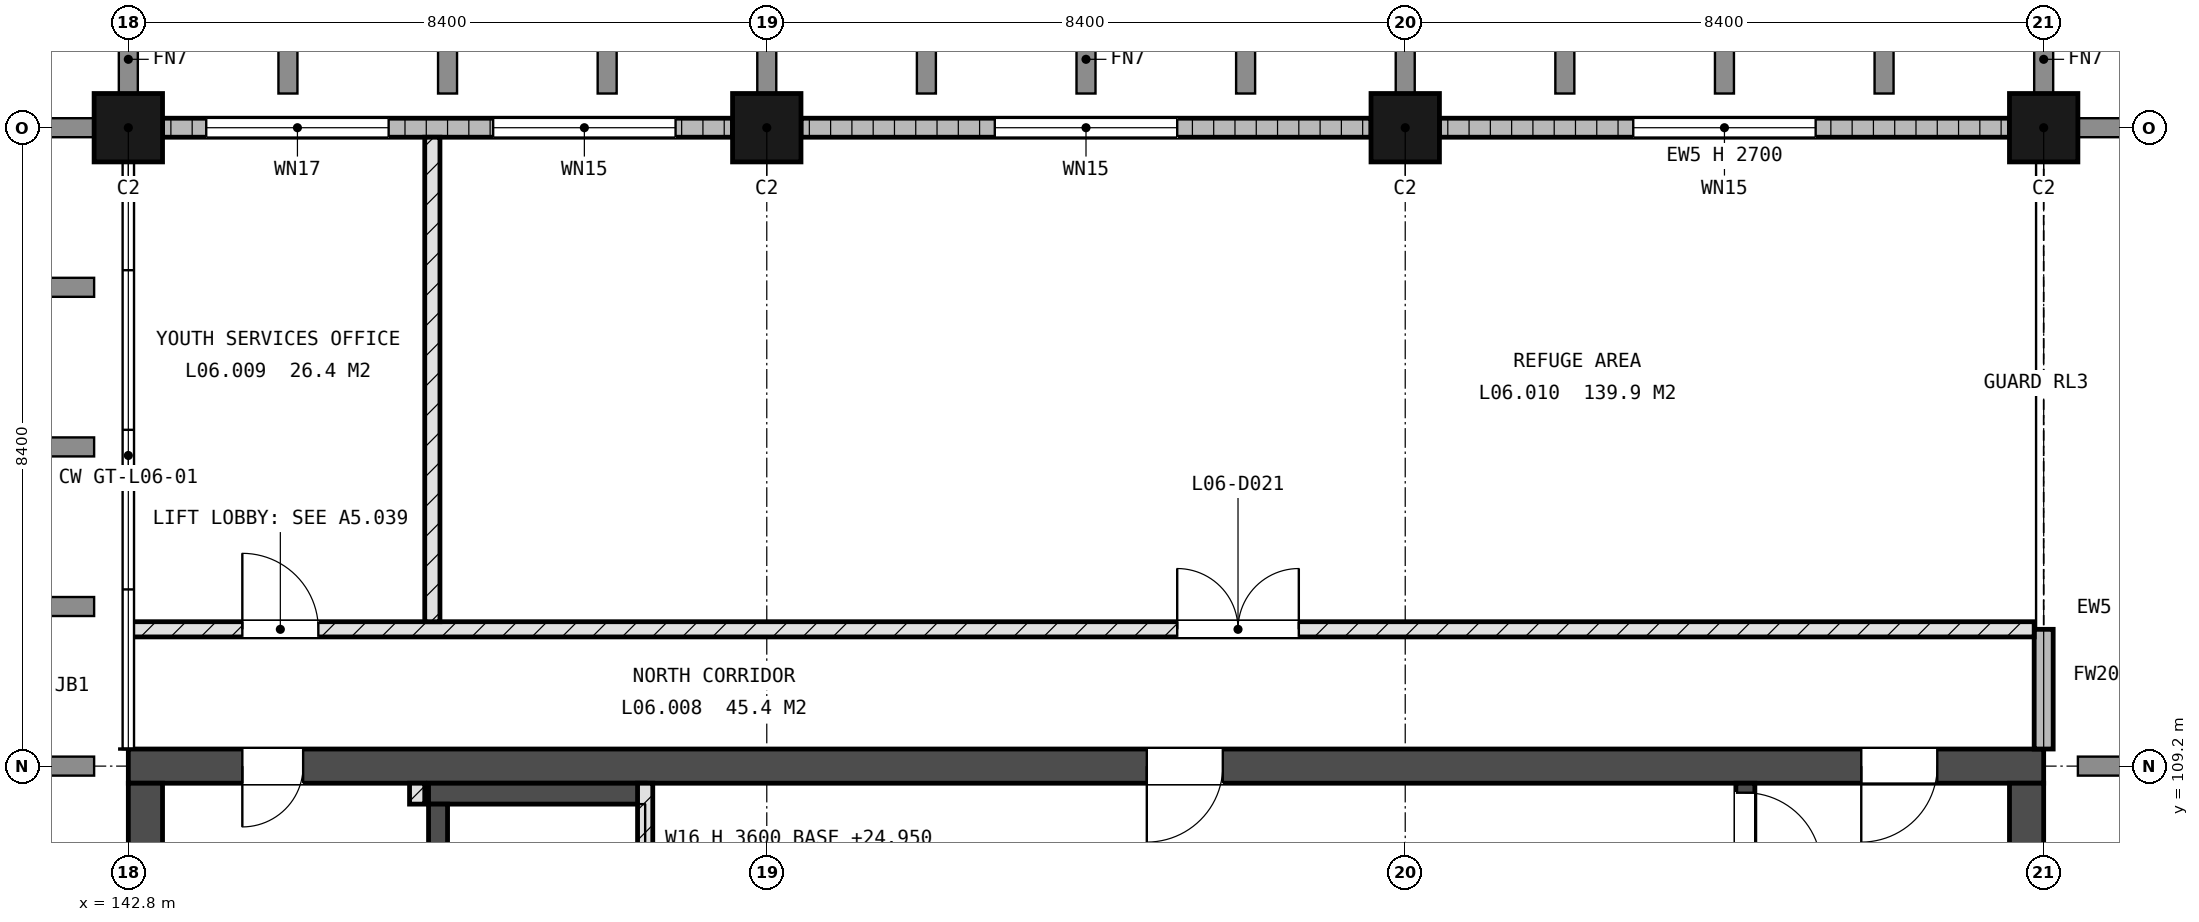
"""IFC4 building model, lengths in metres.
Left out: names, types, materials, properties, quantities, classifications, styles, units other than length and angle.
Written with IfcOpenShell. Run it as: python <this file> out.ifc"""

import sys

from ifc_helpers import new_model, si_unit, direction, frame, frame_2d, origin, origin_2d, place, context, subcontext, project, spatial, rectangle, extrude, element, fill, save


model = new_model("IFC4")
c1 = context("Model", 3, precision=1e-05, world=origin(), true_north=direction((0.0, 1.0)))
c2 = subcontext(c1, "Body", "Model", "MODEL_VIEW")
j1 = project(units=[si_unit("LENGTHUNIT", "METRE"), si_unit("PLANEANGLEUNIT", "RADIAN")], contexts=[c1])
p1 = place(None, origin())
s1 = spatial("IfcSite", under=j1, at=p1, CompositionType="ELEMENT")
p2 = place(p1, origin())
s2 = spatial("IfcBuilding", under=s1, at=p2, CompositionType="ELEMENT")
p3 = place(p2, frame((0.0, 0.0, 25.2)))
s3 = spatial("IfcBuildingStorey", under=s2, at=p3, CompositionType="ELEMENT", Elevation=25.2)
for number, where, z_axis, x_axis in (
    (1, (142.8, 117.6, -0.25), (0.0, 0.0, 1.0), (1.0, 0.0, 0.0)),
    (2, (151.2, 117.6, -0.25), (0.0, 0.0, 1.0), (1.0, 0.0, 0.0)),
    (3, (159.6, 117.6, -0.25), (0.0, 0.0, 1.0), (1.0, 0.0, 0.0)),
    (4, (168.0, 117.6, -0.25), (0.0, 0.0, 1.0), (1.0, 0.0, 0.0)),
):
    element("IfcColumn", number, at=place(p3, frame(where, z_axis=z_axis, x_axis=x_axis)), inside=s3, PredefinedType="COLUMN", context=c2, shape_type="SweptSolid", body=[
        extrude(rectangle(XDim=0.9, YDim=0.9, at=origin_2d()), origin(), (0.0, 0.0, 1.0), 3.6),
    ])
p4 = place(p3, frame((142.8, 109.2, -0.25), z_axis=(0.0, 0.0, 1.0), x_axis=(1.0, 0.0, 0.0)))
e5 = element("IfcWall", 5, at=p4, inside=s3, PredefinedType="SHEAR", context=c2, shape_type="SweptSolid", body=[
    extrude(rectangle(XDim=25.2, YDim=0.45, at=frame_2d((12.6, 0.0))), origin(), (0.0, 0.0, 1.0), 3.6),
])
p5 = place(p4, frame((22.8, 0.0, 0.25)))
e6 = element("IfcOpeningElement", 6, at=p5, cuts=e5, PredefinedType="OPENING", context=c2, shape_type="SweptSolid", body=[
    extrude(rectangle(XDim=1.0, YDim=2.1, at=frame_2d((0.5, 1.05))), frame((0.0, 0.235, 0.0), z_axis=(0.0, -1.0, 0.0), x_axis=(1.0, 0.0, 0.0)), (0.0, 0.0, 1.0), 0.47),
])
p6 = place(p4, frame((1.5, 0.0, 0.25)))
e7 = element("IfcOpeningElement", 7, at=p6, cuts=e5, PredefinedType="OPENING", context=c2, shape_type="SweptSolid", body=[
    extrude(rectangle(XDim=0.8, YDim=2.1, at=frame_2d((0.4, 1.05))), frame((0.0, 0.235, 0.0), z_axis=(0.0, -1.0, 0.0), x_axis=(1.0, 0.0, 0.0)), (0.0, 0.0, 1.0), 0.47),
])
p7 = place(p4, frame((13.4, 0.0, 0.25)))
e8 = element("IfcOpeningElement", 8, at=p7, cuts=e5, PredefinedType="OPENING", context=c2, shape_type="SweptSolid", body=[
    extrude(rectangle(XDim=1.0, YDim=2.1, at=frame_2d((0.5, 1.05))), frame((0.0, 0.235, 0.0), z_axis=(0.0, -1.0, 0.0), x_axis=(1.0, 0.0, 0.0)), (0.0, 0.0, 1.0), 0.47),
])
p8 = place(p3, frame((143.025, 92.625, -0.25), z_axis=(0.0, 0.0, 1.0), x_axis=(0.0, 1.0, 0.0)))
e9 = element("IfcWall", 9, at=p8, inside=s3, PredefinedType="SHEAR", context=c2, shape_type="SweptSolid", body=[
    extrude(rectangle(XDim=16.35, YDim=0.45, at=frame_2d((8.175, 0.0))), origin(), (0.0, 0.0, 1.0), 3.6),
])
p9 = place(p8, frame((2.975, 0.0, 1.85)))
e10 = element("IfcOpeningElement", 10, at=p9, cuts=e9, PredefinedType="OPENING", context=c2, shape_type="SweptSolid", body=[
    extrude(rectangle(XDim=1.2, YDim=0.9, at=frame_2d((0.6, 0.45))), frame((0.0, 0.235, 0.0), z_axis=(0.0, -1.0, 0.0), x_axis=(1.0, 0.0, 0.0)), (0.0, 0.0, 1.0), 0.47),
])
p10 = place(p3, frame((167.775, 92.625, -0.25), z_axis=(0.0, 0.0, 1.0), x_axis=(0.0, 1.0, 0.0)))
e11 = element("IfcWall", 11, at=p10, inside=s3, PredefinedType="SHEAR", context=c2, shape_type="SweptSolid", body=[
    extrude(rectangle(XDim=16.35, YDim=0.45, at=frame_2d((8.175, 0.0))), origin(), (0.0, 0.0, 1.0), 3.6),
])
p11 = place(p10, frame((12.175, 0.0, 1.85)))
e12 = element("IfcOpeningElement", 12, at=p11, cuts=e11, PredefinedType="OPENING", context=c2, shape_type="SweptSolid", body=[
    extrude(rectangle(XDim=1.2, YDim=0.9, at=frame_2d((0.6, 0.45))), frame((0.0, 0.235, 0.0), z_axis=(0.0, -1.0, 0.0), x_axis=(1.0, 0.0, 0.0)), (0.0, 0.0, 1.0), 0.47),
])
p12 = place(p3, frame((164.075, 101.35, -0.25), z_axis=(0.0, 0.0, 1.0), x_axis=(0.0, 1.0, 0.0)))
e13 = element("IfcWall", 13, at=p12, inside=s3, PredefinedType="SHEAR", context=c2, shape_type="SweptSolid", body=[
    extrude(rectangle(XDim=7.625, YDim=0.25, at=frame_2d((3.812, 0.0))), origin(), (0.0, 0.0, 1.0), 3.6),
])
p13 = place(p12, frame((6.5, 0.0, 0.25)))
e14 = element("IfcOpeningElement", 14, at=p13, cuts=e13, PredefinedType="OPENING", context=c2, shape_type="SweptSolid", body=[
    extrude(rectangle(XDim=1.0, YDim=2.1, at=frame_2d((0.5, 1.05))), frame((0.0, 0.135, 0.0), z_axis=(0.0, -1.0, 0.0), x_axis=(1.0, 0.0, 0.0)), (0.0, 0.0, 1.0), 0.27),
])
p14 = place(p3, frame((146.75, 108.837, -0.25), z_axis=(0.0, 0.0, 1.0), x_axis=(1.0, 0.0, 0.0)))
e15 = element("IfcWall", 15, at=p14, inside=s3, PredefinedType="SHEAR", context=c2, shape_type="SweptSolid", body=[
    extrude(rectangle(XDim=2.85, YDim=0.275, at=frame_2d((1.425, 0.0))), origin(), (0.0, 0.0, 1.0), 3.6),
])
p15 = place(p3, frame((146.875, 105.8, -0.25), z_axis=(0.0, 0.0, 1.0), x_axis=(0.0, 1.0, 0.0)))
e16 = element("IfcWall", 16, at=p15, inside=s3, PredefinedType="SHEAR", context=c2, shape_type="SweptSolid", body=[
    extrude(rectangle(XDim=2.9, YDim=0.25, at=frame_2d((1.45, 0.0))), origin(), (0.0, 0.0, 1.0), 3.6),
])
p16 = place(p3, frame((143.25, 117.6, 0.0), z_axis=(0.0, 0.0, 1.0), x_axis=(1.0, 0.0, 0.0)))
e17 = element("IfcWall", 17, at=p16, inside=s3, PredefinedType="STANDARD", context=c2, shape_type="SweptSolid", body=[
    extrude(rectangle(XDim=7.5, YDim=0.25, at=frame_2d((3.75, 0.0))), origin(), (0.0, 0.0, 1.0), 2.7),
])
p17 = place(p16, frame((0.575, 0.0, 0.9)))
e18 = element("IfcOpeningElement", 18, at=p17, cuts=e17, PredefinedType="OPENING", context=c2, shape_type="SweptSolid", body=[
    extrude(rectangle(XDim=2.4, YDim=1.5, at=frame_2d((1.2, 0.75))), frame((0.0, 0.135, 0.0), z_axis=(0.0, -1.0, 0.0), x_axis=(1.0, 0.0, 0.0)), (0.0, 0.0, 1.0), 0.27),
])
p18 = place(p16, frame((4.35, 0.0, 0.9)))
e19 = element("IfcOpeningElement", 19, at=p18, cuts=e17, PredefinedType="OPENING", context=c2, shape_type="SweptSolid", body=[
    extrude(rectangle(XDim=2.4, YDim=1.5, at=frame_2d((1.2, 0.75))), frame((0.0, 0.135, 0.0), z_axis=(0.0, -1.0, 0.0), x_axis=(1.0, 0.0, 0.0)), (0.0, 0.0, 1.0), 0.27),
])
p19 = place(p3, frame((151.65, 117.6, 0.0), z_axis=(0.0, 0.0, 1.0), x_axis=(1.0, 0.0, 0.0)))
e20 = element("IfcWall", 20, at=p19, inside=s3, PredefinedType="STANDARD", context=c2, shape_type="SweptSolid", body=[
    extrude(rectangle(XDim=7.5, YDim=0.25, at=frame_2d((3.75, 0.0))), origin(), (0.0, 0.0, 1.0), 2.7),
])
p20 = place(p19, frame((2.55, 0.0, 0.9)))
e21 = element("IfcOpeningElement", 21, at=p20, cuts=e20, PredefinedType="OPENING", context=c2, shape_type="SweptSolid", body=[
    extrude(rectangle(XDim=2.4, YDim=1.5, at=frame_2d((1.2, 0.75))), frame((0.0, 0.135, 0.0), z_axis=(0.0, -1.0, 0.0), x_axis=(1.0, 0.0, 0.0)), (0.0, 0.0, 1.0), 0.27),
])
p21 = place(p3, frame((160.05, 117.6, 0.0), z_axis=(0.0, 0.0, 1.0), x_axis=(1.0, 0.0, 0.0)))
e22 = element("IfcWall", 22, at=p21, inside=s3, PredefinedType="STANDARD", context=c2, shape_type="SweptSolid", body=[
    extrude(rectangle(XDim=7.5, YDim=0.25, at=frame_2d((3.75, 0.0))), origin(), (0.0, 0.0, 1.0), 2.7),
])
p22 = place(p21, frame((2.55, 0.0, 0.9)))
e23 = element("IfcOpeningElement", 23, at=p22, cuts=e22, PredefinedType="OPENING", context=c2, shape_type="SweptSolid", body=[
    extrude(rectangle(XDim=2.4, YDim=1.5, at=frame_2d((1.2, 0.75))), frame((0.0, 0.135, 0.0), z_axis=(0.0, -1.0, 0.0), x_axis=(1.0, 0.0, 0.0)), (0.0, 0.0, 1.0), 0.27),
])
p23 = place(p3, frame((168.0, 109.425, 0.0), z_axis=(0.0, 0.0, 1.0), x_axis=(0.0, 1.0, 0.0)))
e24 = element("IfcWall", 24, at=p23, inside=s3, PredefinedType="STANDARD", context=c2, shape_type="SweptSolid", body=[
    extrude(rectangle(XDim=1.575, YDim=0.25, at=frame_2d((0.788, 0.0))), origin(), (0.0, 0.0, 1.0), 3.3),
])
p24 = place(p3, frame((142.8, 111.0, 0.0), z_axis=(0.0, 0.0, 1.0), x_axis=(1.0, 0.0, 0.0)))
e25 = element("IfcWall", 25, at=p24, inside=s3, PredefinedType="SOLIDWALL", context=c2, shape_type="SweptSolid", body=[
    extrude(rectangle(XDim=25.075, YDim=0.2, at=frame_2d((12.538, 0.0))), origin(), (0.0, 0.0, 1.0), 3.3),
])
p25 = place(p24, frame((1.5, 0.0, 0.0)))
e26 = element("IfcOpeningElement", 26, at=p25, cuts=e25, PredefinedType="OPENING", context=c2, shape_type="SweptSolid", body=[
    extrude(rectangle(XDim=1.0, YDim=2.1, at=frame_2d((0.5, 1.05))), frame((0.0, 0.11, 0.0), z_axis=(0.0, -1.0, 0.0), x_axis=(1.0, 0.0, 0.0)), (0.0, 0.0, 1.0), 0.22),
])
p26 = place(p24, frame((13.8, 0.0, 0.0)))
e27 = element("IfcOpeningElement", 27, at=p26, cuts=e25, PredefinedType="OPENING", context=c2, shape_type="SweptSolid", body=[
    extrude(rectangle(XDim=1.6, YDim=2.25, at=frame_2d((0.8, 1.125))), frame((0.0, 0.11, 0.0), z_axis=(0.0, -1.0, 0.0), x_axis=(1.0, 0.0, 0.0)), (0.0, 0.0, 1.0), 0.22),
])
p27 = place(p3, frame((146.6, 108.7, 0.0), z_axis=(0.0, 0.0, 1.0), x_axis=(0.0, 1.0, 0.0)))
e28 = element("IfcWall", 28, at=p27, inside=s3, PredefinedType="SOLIDWALL", context=c2, shape_type="SweptSolid", body=[
    extrude(rectangle(XDim=0.275, YDim=0.2, at=frame_2d((0.138, 0.0))), origin(), (0.0, 0.0, 1.0), 3.3),
])
p28 = place(p3, frame((146.8, 111.1, 0.0), z_axis=(0.0, 0.0, 1.0), x_axis=(0.0, 1.0, 0.0)))
e29 = element("IfcWall", 29, at=p28, inside=s3, PredefinedType="SOLIDWALL", context=c2, shape_type="SweptSolid", body=[
    extrude(rectangle(XDim=6.375, YDim=0.2, at=frame_2d((3.188, 0.0))), origin(), (0.0, 0.0, 1.0), 3.3),
])
p29 = place(p3, frame((149.6, 105.3, 0.0), z_axis=(0.0, 0.0, 1.0), x_axis=(0.0, 1.0, 0.0)))
e30 = element("IfcWall", 30, at=p29, inside=s3, PredefinedType="SOLIDWALL", context=c2, shape_type="SweptSolid", body=[
    extrude(rectangle(XDim=3.675, YDim=0.2, at=frame_2d((1.837, 0.0))), origin(), (0.0, 0.0, 1.0), 3.3),
])
p30 = place(p29, frame((1.4, 0.0, 0.0)))
e31 = element("IfcOpeningElement", 31, at=p30, cuts=e30, PredefinedType="OPENING", context=c2, shape_type="SweptSolid", body=[
    extrude(rectangle(XDim=1.1, YDim=2.1, at=frame_2d((0.55, 1.05))), frame((0.0, 0.11, 0.0), z_axis=(0.0, -1.0, 0.0), x_axis=(1.0, 0.0, 0.0)), (0.0, 0.0, 1.0), 0.22),
])
p31 = place(p17, origin())
e32 = element("IfcWindow", 32, at=p31, inside=s3, PartitioningType="SINGLE_PANEL", PredefinedType="WINDOW", context=c2, shape_type="SweptSolid", body=[
    extrude(rectangle(XDim=2.4, YDim=1.5, at=frame_2d((1.2, 0.75))), frame((0.0, 0.03, 0.0), z_axis=(0.0, -1.0, 0.0), x_axis=(1.0, 0.0, 0.0)), (0.0, 0.0, 1.0), 0.06),
])
fill(e18, e32)
p32 = place(p18, origin())
e33 = element("IfcWindow", 33, at=p32, inside=s3, PartitioningType="SINGLE_PANEL", PredefinedType="WINDOW", context=c2, shape_type="SweptSolid", body=[
    extrude(rectangle(XDim=2.4, YDim=1.5, at=frame_2d((1.2, 0.75))), frame((0.0, 0.03, 0.0), z_axis=(0.0, -1.0, 0.0), x_axis=(1.0, 0.0, 0.0)), (0.0, 0.0, 1.0), 0.06),
])
fill(e19, e33)
p33 = place(p20, origin())
e34 = element("IfcWindow", 34, at=p33, inside=s3, PartitioningType="SINGLE_PANEL", PredefinedType="WINDOW", context=c2, shape_type="SweptSolid", body=[
    extrude(rectangle(XDim=2.4, YDim=1.5, at=frame_2d((1.2, 0.75))), frame((0.0, 0.03, 0.0), z_axis=(0.0, -1.0, 0.0), x_axis=(1.0, 0.0, 0.0)), (0.0, 0.0, 1.0), 0.06),
])
fill(e21, e34)
p34 = place(p22, origin())
e35 = element("IfcWindow", 35, at=p34, inside=s3, PartitioningType="SINGLE_PANEL", PredefinedType="WINDOW", context=c2, shape_type="SweptSolid", body=[
    extrude(rectangle(XDim=2.4, YDim=1.5, at=frame_2d((1.2, 0.75))), frame((0.0, 0.03, 0.0), z_axis=(0.0, -1.0, 0.0), x_axis=(1.0, 0.0, 0.0)), (0.0, 0.0, 1.0), 0.06),
])
fill(e23, e35)
p35 = place(p13, origin())
e36 = element("IfcDoor", 36, at=p35, inside=s3, OperationType="SINGLE_SWING_LEFT", PredefinedType="DOOR", context=c2, shape_type="SweptSolid", body=[
    extrude(rectangle(XDim=1.0, YDim=2.1, at=frame_2d((0.5, 1.05))), frame((0.0, 0.025, 0.0), z_axis=(0.0, -1.0, 0.0), x_axis=(1.0, 0.0, 0.0)), (0.0, 0.0, 1.0), 0.05),
])
fill(e14, e36)
p36 = place(p5, origin())
e37 = element("IfcDoor", 37, at=p36, inside=s3, OperationType="SINGLE_SWING_LEFT", PredefinedType="DOOR", context=c2, shape_type="SweptSolid", body=[
    extrude(rectangle(XDim=1.0, YDim=2.1, at=frame_2d((0.5, 1.05))), frame((0.0, 0.025, 0.0), z_axis=(0.0, -1.0, 0.0), x_axis=(1.0, 0.0, 0.0)), (0.0, 0.0, 1.0), 0.05),
])
fill(e6, e37)
p37 = place(p25, origin())
e38 = element("IfcDoor", 38, at=p37, inside=s3, OperationType="SINGLE_SWING_RIGHT", PredefinedType="DOOR", context=c2, shape_type="SweptSolid", body=[
    extrude(rectangle(XDim=1.0, YDim=2.1, at=frame_2d((0.5, 1.05))), frame((0.0, 0.025, 0.0), z_axis=(0.0, -1.0, 0.0), x_axis=(1.0, 0.0, 0.0)), (0.0, 0.0, 1.0), 0.05),
])
fill(e26, e38)
p38 = place(p26, origin())
e39 = element("IfcDoor", 39, at=p38, inside=s3, OperationType="DOUBLE_DOOR_SINGLE_SWING", PredefinedType="DOOR", context=c2, shape_type="SweptSolid", body=[
    extrude(rectangle(XDim=1.6, YDim=2.25, at=frame_2d((0.8, 1.125))), frame((0.0, 0.025, 0.0), z_axis=(0.0, -1.0, 0.0), x_axis=(1.0, 0.0, 0.0)), (0.0, 0.0, 1.0), 0.05),
])
fill(e27, e39)
p39 = place(p6, origin())
e40 = element("IfcDoor", 40, at=p39, inside=s3, OperationType="SINGLE_SWING_LEFT", PredefinedType="DOOR", context=c2, shape_type="SweptSolid", body=[
    extrude(rectangle(XDim=0.8, YDim=2.1, at=frame_2d((0.4, 1.05))), frame((0.0, 0.025, 0.0), z_axis=(0.0, -1.0, 0.0), x_axis=(1.0, 0.0, 0.0)), (0.0, 0.0, 1.0), 0.05),
])
fill(e7, e40)
p40 = place(p7, origin())
e41 = element("IfcDoor", 41, at=p40, inside=s3, OperationType="SINGLE_SWING_LEFT", PredefinedType="DOOR", context=c2, shape_type="SweptSolid", body=[
    extrude(rectangle(XDim=1.0, YDim=2.1, at=frame_2d((0.5, 1.05))), frame((0.0, 0.025, 0.0), z_axis=(0.0, -1.0, 0.0), x_axis=(1.0, 0.0, 0.0)), (0.0, 0.0, 1.0), 0.05),
])
fill(e8, e41)
save(model, sys.argv[1])
